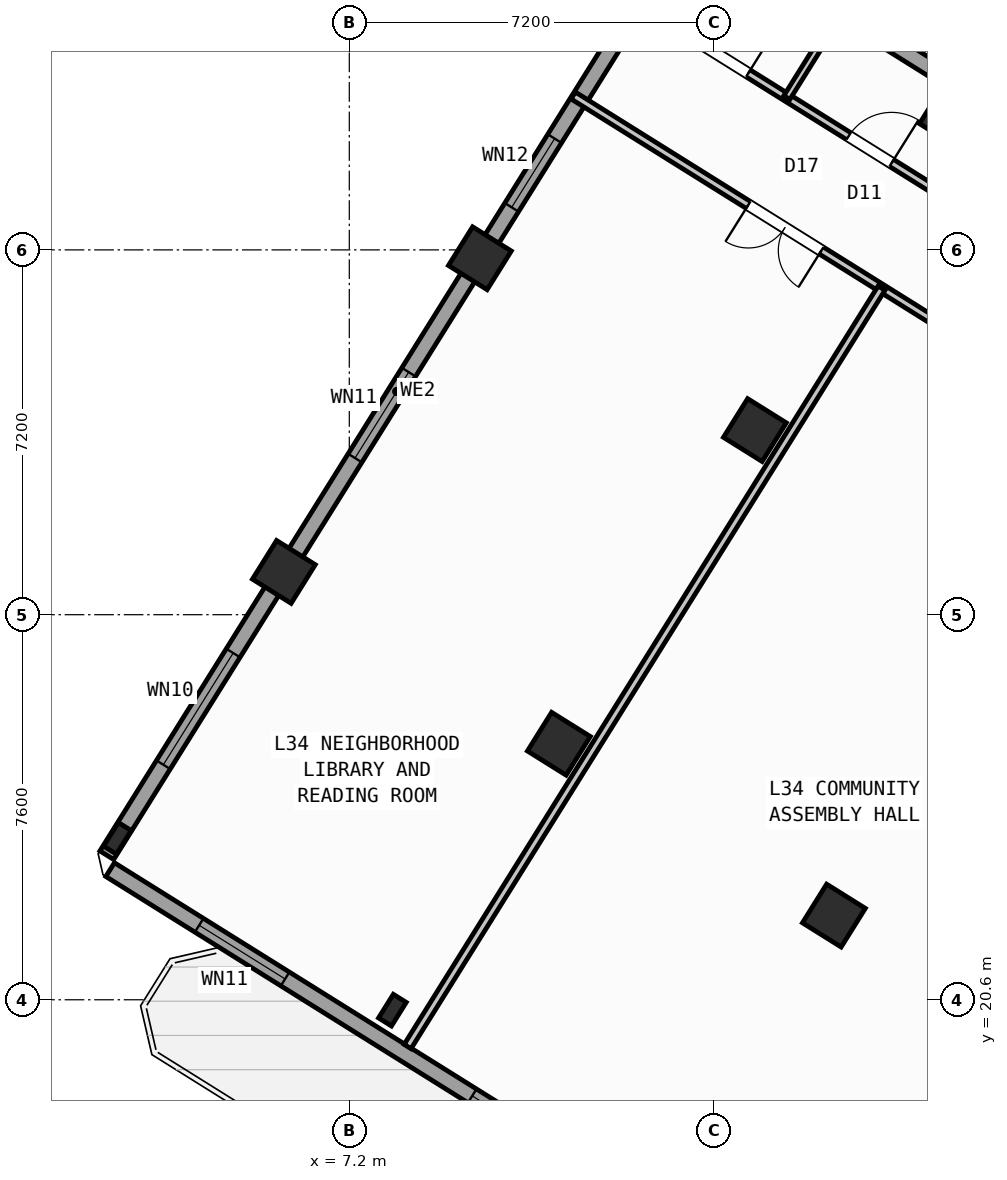
"""IFC4 building model, lengths in metres.
Left out: names, types, materials, properties, quantities, classifications, styles, units other than length and angle.
Written with IfcOpenShell. Run it as: python <this file> out.ifc"""

import sys

from ifc_helpers import new_model, si_unit, direction, frame, frame_2d, origin, origin_2d, place, context, subcontext, project, spatial, rectangle, hollow_rectangle, i_section, extrude, source, transform, mapped, element, fill, save


model = new_model("IFC4")
c1 = context("Model", 3, precision=1e-05, world=origin(), true_north=direction((0.0, 1.0)))
c2 = subcontext(c1, "Body", "Model", "MODEL_VIEW")
j1 = project(units=[si_unit("LENGTHUNIT", "METRE"), si_unit("PLANEANGLEUNIT", "RADIAN")], contexts=[c1])
p1 = place(None, origin())
s1 = spatial("IfcSite", under=j1, at=p1, CompositionType="ELEMENT")
p2 = place(p1, origin())
s2 = spatial("IfcBuilding", under=s1, at=p2, CompositionType="ELEMENT")
p3 = place(p2, frame((0.0, 0.0, 136.2)))
s3 = spatial("IfcBuildingStorey", under=s2, at=p3, CompositionType="ELEMENT", Elevation=136.2)
m1 = source(origin(), c2, "Body", "SweptSolid", [
    extrude(hollow_rectangle(XDim=0.9, YDim=0.9, WallThickness=0.036, at=origin_2d()), origin(), (0.0, 0.0, 1.0), 4.5),
])
for number, where, z_axis, x_axis in (
    (1, (16.764, 22.261, 0.0), (0.0, 0.0, 1.0), (-0.848, 0.53, 0.0)),
    (2, (19.073, 38.034, 0.0), (0.0, 0.0, 1.0), (-0.848, 0.53, 0.0)),
    (3, (15.205, 31.844, 0.0), (0.0, 0.0, 1.0), (-0.848, 0.53, 0.0)),
    (4, (11.336, 25.653, 0.0), (0.0, 0.0, 1.0), (-0.848, 0.53, 0.0)),
):
    element("IfcColumn", number, at=place(p3, frame(where, z_axis=z_axis, x_axis=x_axis)), inside=s3, PredefinedType="COLUMN", context=c2, shape_type="MappedRepresentation", body=[
        mapped(m1, transform((0.0, 0.0, 0.0), scale=1.0)),
    ])
m2 = source(origin(), c2, "Body", "SweptSolid", [
    extrude(i_section(OverallWidth=0.3, OverallDepth=0.55, WebThickness=0.015, FlangeThickness=0.029, at=origin_2d()), origin(), (0.0, 0.0, 1.0), 4.5),
])
p4 = place(p3, frame((8.051, 20.395, 0.0), z_axis=(0.0, 0.0, 1.0), x_axis=(-0.848048096156, 0.529919264233, 0.0)))
e5 = element("IfcColumn", 5, at=p4, inside=s3, PredefinedType="COLUMN", context=c2, shape_type="MappedRepresentation", body=[
    mapped(m2, transform((0.0, 0.0, 0.0), scale=1.0)),
])
for number, where, z_axis, x_axis in (
    (6, (9.777, 35.235, 0.0), (0.0, 0.0, 1.0), (-0.848, 0.53, 0.0)),
    (7, (5.909, 29.044, 0.0), (0.0, 0.0, 1.0), (-0.848, 0.53, 0.0)),
):
    element("IfcColumn", number, at=place(p3, frame(where, z_axis=z_axis, x_axis=x_axis)), inside=s3, PredefinedType="COLUMN", context=c2, shape_type="MappedRepresentation", body=[
        mapped(m1, transform((0.0, 0.0, 0.0), scale=1.0)),
    ])
p5 = place(p3, frame((2.623, 23.786, 0.0), z_axis=(0.0, 0.0, 1.0), x_axis=(-0.848048096156, 0.529919264233, 0.0)))
e8 = element("IfcColumn", 8, at=p5, inside=s3, PredefinedType="COLUMN", context=c2, shape_type="MappedRepresentation", body=[
    mapped(m2, transform((0.0, 0.0, 0.0), scale=1.0)),
])
p6 = place(p3, frame((29.268, 6.429, 0.0), z_axis=(0.0, 0.0, 1.0), x_axis=(-0.848049971435, 0.529916263149, 0.0)))
e9 = element("IfcWall", 9, at=p6, inside=s3, PredefinedType="STANDARD", context=c2, shape_type="SweptSolid", body=[
    extrude(rectangle(XDim=31.588, YDim=0.32, at=frame_2d((15.794, 0.0))), origin(), (0.0, 0.0, 1.0), 4.25),
])
p7 = place(p6, frame((16.374, 0.0, 0.0)))
e10 = element("IfcOpeningElement", 10, at=p7, cuts=e9, PredefinedType="OPENING", context=c2, shape_type="SweptSolid", body=[
    extrude(rectangle(XDim=1.2, YDim=2.15, at=frame_2d((0.6, 1.075))), frame((0.0, 0.17, 0.0), z_axis=(0.0, -1.0, 0.0), x_axis=(1.0, 0.0, 0.0)), (0.0, 0.0, 1.0), 0.34),
])
p8 = place(p6, frame((20.561, 0.0, 0.7)))
e11 = element("IfcOpeningElement", 11, at=p8, cuts=e9, PredefinedType="OPENING", context=c2, shape_type="SweptSolid", body=[
    extrude(rectangle(XDim=2.6, YDim=2.0, at=frame_2d((1.3, 1.0))), frame((0.0, 0.17, 0.0), z_axis=(0.0, -1.0, 0.0), x_axis=(1.0, 0.0, 0.0)), (0.0, 0.0, 1.0), 0.34),
])
p9 = place(p6, frame((27.516, 0.0, 0.75)))
e12 = element("IfcOpeningElement", 12, at=p9, cuts=e9, PredefinedType="OPENING", context=c2, shape_type="SweptSolid", body=[
    extrude(rectangle(XDim=2.0, YDim=1.95, at=frame_2d((1.0, 0.975))), frame((0.0, 0.17, 0.0), z_axis=(0.0, -1.0, 0.0), x_axis=(1.0, 0.0, 0.0)), (0.0, 0.0, 1.0), 0.34),
])
p10 = place(p3, frame((2.415, 23.452, 0.0), z_axis=(0.0, 0.0, 1.0), x_axis=(0.52991049553, 0.848053575387, 0.0)))
e13 = element("IfcWall", 13, at=p10, inside=s3, PredefinedType="STANDARD", context=c2, shape_type="SweptSolid", body=[
    extrude(rectangle(XDim=21.587, YDim=0.32, at=frame_2d((10.794, 0.0))), origin(), (0.0, 0.0, 1.0), 3.675),
])
p11 = place(p10, frame((2.106, 0.0, 0.7)))
e14 = element("IfcOpeningElement", 14, at=p11, cuts=e13, PredefinedType="OPENING", context=c2, shape_type="SweptSolid", body=[
    extrude(rectangle(XDim=2.6, YDim=2.0, at=frame_2d((1.3, 1.0))), frame((0.0, 0.17, 0.0), z_axis=(0.0, -1.0, 0.0), x_axis=(1.0, 0.0, 0.0)), (0.0, 0.0, 1.0), 0.34),
])
p12 = place(p10, frame((9.244, 0.0, 0.75)))
e15 = element("IfcOpeningElement", 15, at=p12, cuts=e13, PredefinedType="OPENING", context=c2, shape_type="SweptSolid", body=[
    extrude(rectangle(XDim=2.0, YDim=1.95, at=frame_2d((1.0, 0.975))), frame((0.0, 0.17, 0.0), z_axis=(0.0, -1.0, 0.0), x_axis=(1.0, 0.0, 0.0)), (0.0, 0.0, 1.0), 0.34),
])
p13 = place(p10, frame((15.079, 0.0, 0.85)))
e16 = element("IfcOpeningElement", 16, at=p13, cuts=e13, PredefinedType="OPENING", context=c2, shape_type="SweptSolid", body=[
    extrude(rectangle(XDim=1.6, YDim=1.8, at=frame_2d((0.8, 0.9))), frame((0.0, 0.17, 0.0), z_axis=(0.0, -1.0, 0.0), x_axis=(1.0, 0.0, 0.0)), (0.0, 0.0, 1.0), 0.34),
])
p14 = place(p3, frame((14.138, 41.825, 0.0), z_axis=(0.0, 0.0, 1.0), x_axis=(0.848046498049, -0.529921821731, 0.0)))
e17 = element("IfcWall", 17, at=p14, inside=s3, PredefinedType="STANDARD", context=c2, shape_type="SweptSolid", body=[
    extrude(rectangle(XDim=31.588, YDim=0.32, at=frame_2d((15.794, 0.0))), origin(), (0.0, 0.0, 1.0), 4.25),
])
p15 = place(p14, frame((9.857, 0.0, 0.0)))
e18 = element("IfcOpeningElement", 18, at=p15, cuts=e17, PredefinedType="OPENING", context=c2, shape_type="SweptSolid", body=[
    extrude(rectangle(XDim=1.05, YDim=2.15, at=frame_2d((0.525, 1.075))), frame((0.0, 0.17, 0.0), z_axis=(0.0, -1.0, 0.0), x_axis=(1.0, 0.0, 0.0)), (0.0, 0.0, 1.0), 0.34),
])
p16 = place(p14, frame((0.862, 0.0, 0.85)))
e19 = element("IfcOpeningElement", 19, at=p16, cuts=e17, PredefinedType="OPENING", context=c2, shape_type="SweptSolid", body=[
    extrude(rectangle(XDim=1.6, YDim=1.8, at=frame_2d((0.8, 0.9))), frame((0.0, 0.17, 0.0), z_axis=(0.0, -1.0, 0.0), x_axis=(1.0, 0.0, 0.0)), (0.0, 0.0, 1.0), 0.34),
])
p17 = place(p14, frame((7.648, 0.0, 0.85)))
e20 = element("IfcOpeningElement", 20, at=p17, cuts=e17, PredefinedType="OPENING", context=c2, shape_type="SweptSolid", body=[
    extrude(rectangle(XDim=1.6, YDim=1.8, at=frame_2d((0.8, 0.9))), frame((0.0, 0.17, 0.0), z_axis=(0.0, -1.0, 0.0), x_axis=(1.0, 0.0, 0.0)), (0.0, 0.0, 1.0), 0.34),
])
p18 = place(p14, frame((13.824, 0.0, 0.85)))
e21 = element("IfcOpeningElement", 21, at=p18, cuts=e17, PredefinedType="OPENING", context=c2, shape_type="SweptSolid", body=[
    extrude(rectangle(XDim=1.6, YDim=1.8, at=frame_2d((0.8, 0.9))), frame((0.0, 0.17, 0.0), z_axis=(0.0, -1.0, 0.0), x_axis=(1.0, 0.0, 0.0)), (0.0, 0.0, 1.0), 0.34),
])
p19 = place(p14, frame((21.294, 0.0, 0.7)))
e22 = element("IfcOpeningElement", 22, at=p19, cuts=e17, PredefinedType="OPENING", context=c2, shape_type="SweptSolid", body=[
    extrude(rectangle(XDim=2.6, YDim=2.0, at=frame_2d((1.3, 1.0))), frame((0.0, 0.17, 0.0), z_axis=(0.0, -1.0, 0.0), x_axis=(1.0, 0.0, 0.0)), (0.0, 0.0, 1.0), 0.34),
])
p20 = place(p14, frame((26.894, 0.0, 0.7)))
e23 = element("IfcOpeningElement", 23, at=p20, cuts=e17, PredefinedType="OPENING", context=c2, shape_type="SweptSolid", body=[
    extrude(rectangle(XDim=2.6, YDim=2.0, at=frame_2d((1.3, 1.0))), frame((0.0, 0.17, 0.0), z_axis=(0.0, -1.0, 0.0), x_axis=(1.0, 0.0, 0.0)), (0.0, 0.0, 1.0), 0.34),
])
p21 = place(p3, frame((25.807, 29.582, 0.0), z_axis=(0.0, 0.0, 1.0), x_axis=(-0.529918119251, -0.84804881162, 0.0)))
e24 = element("IfcWall", 24, at=p21, inside=s3, PredefinedType="PARTITIONING", context=c2, shape_type="SweptSolid", body=[
    extrude(rectangle(XDim=17.65, YDim=0.16, at=frame_2d((8.825, 0.0))), origin(), (0.0, 0.0, 1.0), 4.24),
])
p22 = place(p3, frame((26.973, 31.447, 0.0), z_axis=(0.0, 0.0, 1.0), x_axis=(-0.848048310262, 0.529918921593, 0.0)))
e25 = element("IfcWall", 25, at=p22, inside=s3, PredefinedType="PARTITIONING", context=c2, shape_type="SweptSolid", body=[
    extrude(rectangle(XDim=16.73, YDim=0.16, at=frame_2d((8.365, 0.0))), origin(), (0.0, 0.0, 1.0), 4.24),
])
p23 = place(p22, frame((1.8, 0.0, 0.0)))
e26 = element("IfcOpeningElement", 26, at=p23, cuts=e25, PredefinedType="OPENING", context=c2, shape_type="SweptSolid", body=[
    extrude(rectangle(XDim=1.0, YDim=2.1, at=frame_2d((0.5, 1.05))), frame((0.0, 0.09, 0.0), z_axis=(0.0, -1.0, 0.0), x_axis=(1.0, 0.0, 0.0)), (0.0, 0.0, 1.0), 0.18),
])
p24 = place(p22, frame((10.695, 0.0, 0.0)))
e27 = element("IfcOpeningElement", 27, at=p24, cuts=e25, PredefinedType="OPENING", context=c2, shape_type="SweptSolid", body=[
    extrude(rectangle(XDim=1.0, YDim=2.1, at=frame_2d((0.5, 1.05))), frame((0.0, 0.09, 0.0), z_axis=(0.0, -1.0, 0.0), x_axis=(1.0, 0.0, 0.0)), (0.0, 0.0, 1.0), 0.18),
])
p25 = place(p22, frame((14.033, 0.0, 0.0)))
e28 = element("IfcOpeningElement", 28, at=p25, cuts=e25, PredefinedType="OPENING", context=c2, shape_type="SweptSolid", body=[
    extrude(rectangle(XDim=1.0, YDim=2.1, at=frame_2d((0.5, 1.05))), frame((0.0, 0.09, 0.0), z_axis=(0.0, -1.0, 0.0), x_axis=(1.0, 0.0, 0.0)), (0.0, 0.0, 1.0), 0.18),
])
p26 = place(p3, frame((25.807, 29.582, 0.0), z_axis=(0.0, 0.0, 1.0), x_axis=(-0.848052408131, 0.529912363569, 0.0)))
e29 = element("IfcWall", 29, at=p26, inside=s3, PredefinedType="PARTITIONING", context=c2, shape_type="SweptSolid", body=[
    extrude(rectangle(XDim=16.73, YDim=0.16, at=frame_2d((8.365, 0.0))), origin(), (0.0, 0.0, 1.0), 4.24),
])
p27 = place(p26, frame((1.8, 0.0, 0.0)))
e30 = element("IfcOpeningElement", 30, at=p27, cuts=e29, PredefinedType="OPENING", context=c2, shape_type="SweptSolid", body=[
    extrude(rectangle(XDim=1.7, YDim=2.2, at=frame_2d((0.85, 1.1))), frame((0.0, 0.09, 0.0), z_axis=(0.0, -1.0, 0.0), x_axis=(1.0, 0.0, 0.0)), (0.0, 0.0, 1.0), 0.18),
])
p28 = place(p26, frame((10.955, 0.0, 0.0)))
e31 = element("IfcOpeningElement", 31, at=p28, cuts=e29, PredefinedType="OPENING", context=c2, shape_type="SweptSolid", body=[
    extrude(rectangle(XDim=1.7, YDim=2.2, at=frame_2d((0.85, 1.1))), frame((0.0, 0.09, 0.0), z_axis=(0.0, -1.0, 0.0), x_axis=(1.0, 0.0, 0.0)), (0.0, 0.0, 1.0), 0.18),
])
p29 = place(p3, frame((17.704, 34.645, 0.0), z_axis=(0.0, 0.0, 1.0), x_axis=(-0.529918119251, -0.84804881162, 0.0)))
e32 = element("IfcWall", 32, at=p29, inside=s3, PredefinedType="PARTITIONING", context=c2, shape_type="SweptSolid", body=[
    extrude(rectangle(XDim=17.65, YDim=0.16, at=frame_2d((8.825, 0.0))), origin(), (0.0, 0.0, 1.0), 4.24),
])
p30 = place(p3, frame((16.895, 40.103, 0.0), z_axis=(0.0, 0.0, 1.0), x_axis=(-0.529867272195, -0.848080582172, 0.0)))
e33 = element("IfcWall", 33, at=p30, inside=s3, PredefinedType="PLUMBINGWALL", context=c2, shape_type="SweptSolid", body=[
    extrude(rectangle(XDim=2.0, YDim=0.14, at=frame_2d((1.0, 0.0))), origin(), (0.0, 0.0, 1.0), 4.24),
])
m3 = source(origin(), c2, "Body", "SweptSolid", [
    extrude(rectangle(XDim=2.6, YDim=2.0, at=frame_2d((1.3, 1.0))), frame((0.0, 0.03, 0.0), z_axis=(0.0, -1.0, 0.0), x_axis=(1.0, 0.0, 0.0)), (0.0, 0.0, 1.0), 0.06),
])
p31 = place(p8, origin())
e34 = element("IfcWindow", 34, at=p31, inside=s3, PartitioningType="SINGLE_PANEL", PredefinedType="WINDOW", context=c2, shape_type="MappedRepresentation", body=[
    mapped(m3, transform((0.0, 0.0, 0.0), scale=1.0)),
])
fill(e11, e34)
m4 = source(origin(), c2, "Body", "SweptSolid", [
    extrude(rectangle(XDim=2.0, YDim=1.95, at=frame_2d((1.0, 0.975))), frame((0.0, 0.03, 0.0), z_axis=(0.0, -1.0, 0.0), x_axis=(1.0, 0.0, 0.0)), (0.0, 0.0, 1.0), 0.06),
])
p32 = place(p9, origin())
e35 = element("IfcWindow", 35, at=p32, inside=s3, PartitioningType="SINGLE_PANEL", PredefinedType="WINDOW", context=c2, shape_type="MappedRepresentation", body=[
    mapped(m4, transform((0.0, 0.0, 0.0), scale=1.0)),
])
fill(e12, e35)
p33 = place(p11, origin())
e36 = element("IfcWindow", 36, at=p33, inside=s3, PartitioningType="SINGLE_PANEL", PredefinedType="WINDOW", context=c2, shape_type="MappedRepresentation", body=[
    mapped(m3, transform((0.0, 0.0, 0.0), scale=1.0)),
])
fill(e14, e36)
p34 = place(p12, origin())
e37 = element("IfcWindow", 37, at=p34, inside=s3, PartitioningType="SINGLE_PANEL", PredefinedType="WINDOW", context=c2, shape_type="MappedRepresentation", body=[
    mapped(m4, transform((0.0, 0.0, 0.0), scale=1.0)),
])
fill(e15, e37)
m5 = source(origin(), c2, "Body", "SweptSolid", [
    extrude(rectangle(XDim=1.6, YDim=1.8, at=frame_2d((0.8, 0.9))), frame((0.0, 0.03, 0.0), z_axis=(0.0, -1.0, 0.0), x_axis=(1.0, 0.0, 0.0)), (0.0, 0.0, 1.0), 0.06),
])
p35 = place(p13, origin())
e38 = element("IfcWindow", 38, at=p35, inside=s3, PartitioningType="SINGLE_PANEL", PredefinedType="WINDOW", context=c2, shape_type="MappedRepresentation", body=[
    mapped(m5, transform((0.0, 0.0, 0.0), scale=1.0)),
])
fill(e16, e38)
m6 = source(origin(), c2, "Body", "SweptSolid", [
    extrude(rectangle(XDim=1.7, YDim=2.2, at=frame_2d((0.85, 1.1))), frame((0.0, 0.025, 0.0), z_axis=(0.0, -1.0, 0.0), x_axis=(1.0, 0.0, 0.0)), (0.0, 0.0, 1.0), 0.05),
])
p36 = place(p28, origin())
e39 = element("IfcDoor", 39, at=p36, inside=s3, OperationType="DOUBLE_DOOR_SINGLE_SWING", PredefinedType="DOOR", context=c2, shape_type="MappedRepresentation", body=[
    mapped(m6, transform((0.0, 0.0, 0.0), scale=1.0)),
])
fill(e31, e39)
m7 = source(origin(), c2, "Body", "SweptSolid", [
    extrude(rectangle(XDim=1.0, YDim=2.1, at=frame_2d((0.5, 1.05))), frame((0.0, 0.025, 0.0), z_axis=(0.0, -1.0, 0.0), x_axis=(1.0, 0.0, 0.0)), (0.0, 0.0, 1.0), 0.05),
])
p37 = place(p24, frame((1.0, 0.0, 0.0), z_axis=(0.0, 0.0, 1.0), x_axis=(-1.0, 0.0, 0.0)))
e40 = element("IfcDoor", 40, at=p37, inside=s3, OperationType="SINGLE_SWING_RIGHT", PredefinedType="DOOR", context=c2, shape_type="MappedRepresentation", body=[
    mapped(m7, transform((0.0, 0.0, 0.0), scale=1.0)),
])
fill(e27, e40)
p38 = place(p25, frame((1.0, 0.0, 0.0), z_axis=(0.0, 0.0, 1.0), x_axis=(-1.0, 0.0, 0.0)))
e41 = element("IfcDoor", 41, at=p38, inside=s3, OperationType="SINGLE_SWING_RIGHT", PredefinedType="DOOR", context=c2, shape_type="MappedRepresentation", body=[
    mapped(m7, transform((0.0, 0.0, 0.0), scale=1.0)),
])
fill(e28, e41)
save(model, sys.argv[1])
